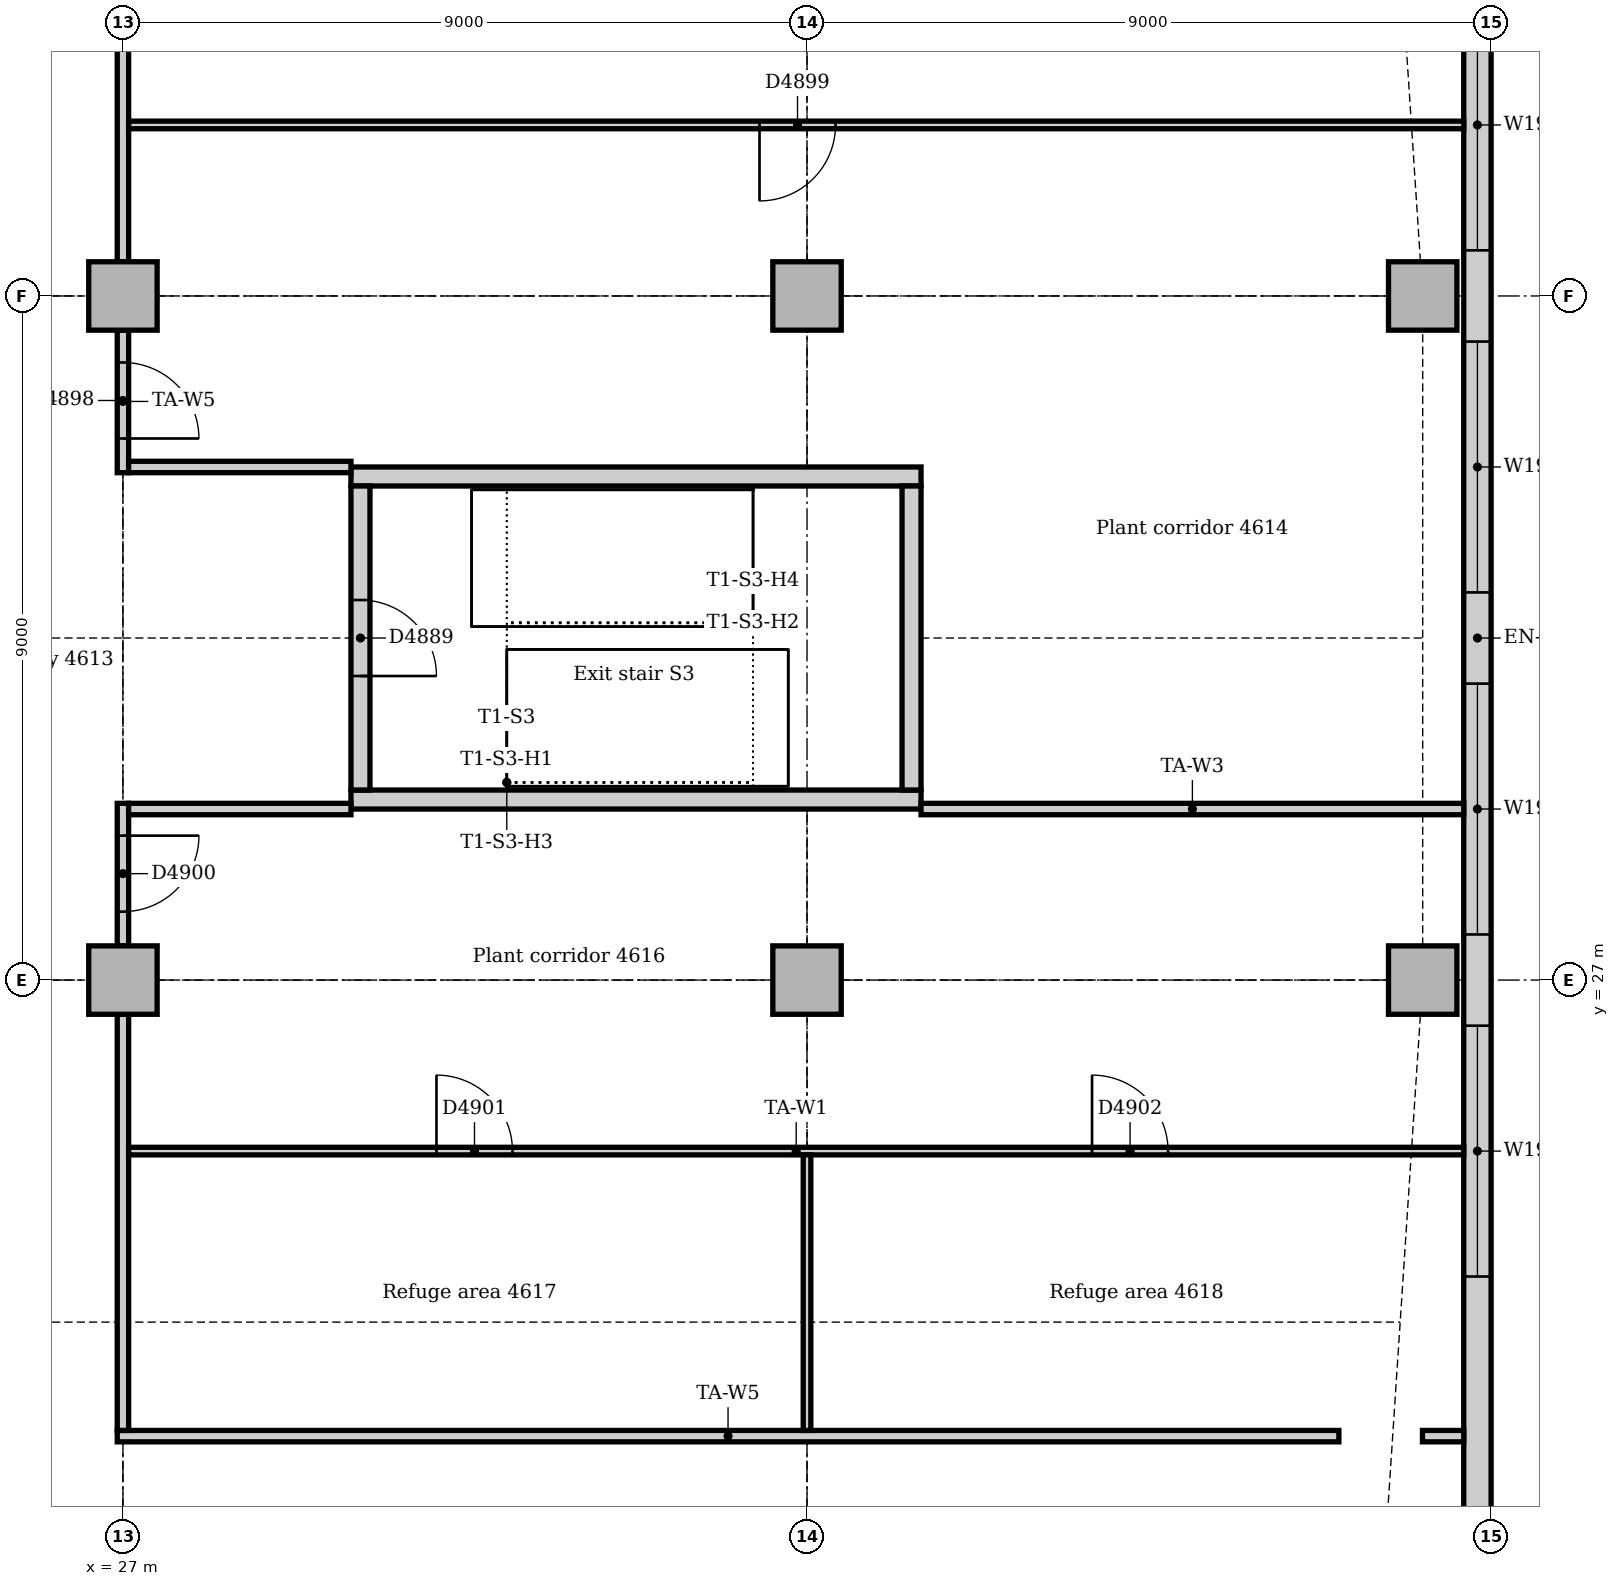
"""IFC4 building model, lengths in metres.
Left out: names, types, materials, properties, quantities, classifications, styles, units other than length and angle.
Written with IfcOpenShell. Run it as: python <this file> out.ifc"""

import sys

from ifc_helpers import new_model, si_unit, direction, frame, frame_2d, origin, origin_2d, place, context, subcontext, project, spatial, rectangle, extrude, element, fill, save


model = new_model("IFC4")
c1 = context("Model", 3, precision=1e-05, world=origin(), true_north=direction((0.0, 1.0)))
c2 = subcontext(c1, "Body", "Model", "MODEL_VIEW")
j1 = project(units=[si_unit("LENGTHUNIT", "METRE"), si_unit("PLANEANGLEUNIT", "RADIAN")], contexts=[c1])
p1 = place(None, origin())
s1 = spatial("IfcSite", under=j1, at=p1, CompositionType="ELEMENT")
p2 = place(p1, origin())
s2 = spatial("IfcBuilding", under=s1, at=p2, CompositionType="ELEMENT")
p3 = place(p2, frame((0.0, 0.0, 193.0)))
s3 = spatial("IfcBuildingStorey", under=s2, at=p3, CompositionType="ELEMENT", Elevation=193.0)
for number, where, z_axis, x_axis in (
    (1, (30.0, 29.375, 0.0), (0.0, 0.0, 1.0), (1.0, 0.0, 0.0)),
    (2, (37.5, 33.625, 0.0), (0.0, 0.0, 1.0), (-1.0, 0.0, 0.0)),
):
    element("IfcWall", number, at=place(p3, frame(where, z_axis=z_axis, x_axis=x_axis)), inside=s3, PredefinedType="SOLIDWALL", context=c2, shape_type="SweptSolid", body=[
        extrude(rectangle(XDim=7.5, YDim=0.25, at=frame_2d((3.75, 0.0))), origin(), (0.0, 0.0, 1.0), 5.0),
    ])
p4 = place(p3, frame((37.375, 29.5, 0.0), z_axis=(0.0, 0.0, 1.0), x_axis=(0.0, 1.0, 0.0)))
e3 = element("IfcWall", 3, at=p4, inside=s3, PredefinedType="SOLIDWALL", context=c2, shape_type="SweptSolid", body=[
    extrude(rectangle(XDim=4.0, YDim=0.25, at=frame_2d((2.0, 0.0))), origin(), (0.0, 0.0, 1.0), 5.0),
])
p5 = place(p3, frame((30.125, 33.5, 0.0), z_axis=(0.0, 0.0, 1.0), x_axis=(0.0, -1.0, 0.0)))
e4 = element("IfcWall", 4, at=p5, inside=s3, PredefinedType="SOLIDWALL", context=c2, shape_type="SweptSolid", body=[
    extrude(rectangle(XDim=4.0, YDim=0.25, at=frame_2d((2.0, 0.0))), origin(), (0.0, 0.0, 1.0), 5.0),
])
p6 = place(p5, frame((1.5, 0.0, 0.0)))
e5 = element("IfcOpeningElement", 5, at=p6, cuts=e4, PredefinedType="OPENING", context=c2, shape_type="SweptSolid", body=[
    extrude(rectangle(XDim=1.0, YDim=2.1, at=frame_2d((0.5, 1.05))), frame((0.0, 0.135, 0.0), z_axis=(0.0, -1.0, 0.0), x_axis=(1.0, 0.0, 0.0)), (0.0, 0.0, 1.0), 0.27),
])
for number, where, z_axis, x_axis in (
    (6, (44.1, 27.0, 0.0), (0.0, 0.0, 1.0), (1.0, 0.0, 0.0)),
    (7, (44.1, 36.0, 0.0), (0.0, 0.0, 1.0), (1.0, 0.0, 0.0)),
    (8, (27.0, 27.0, 0.0), (0.0, 0.0, 1.0), (1.0, 0.0, 0.0)),
    (9, (27.0, 36.0, 0.0), (0.0, 0.0, 1.0), (1.0, 0.0, 0.0)),
    (10, (36.0, 27.0, 0.0), (0.0, 0.0, 1.0), (1.0, 0.0, 0.0)),
    (11, (36.0, 36.0, 0.0), (0.0, 0.0, 1.0), (1.0, 0.0, 0.0)),
):
    element("IfcColumn", number, at=place(p3, frame(where, z_axis=z_axis, x_axis=x_axis)), inside=s3, PredefinedType="COLUMN", context=c2, shape_type="SweptSolid", body=[
        extrude(rectangle(XDim=0.9, YDim=0.9, at=origin_2d()), origin(), (0.0, 0.0, 1.0), 4.85),
    ])
p7 = place(p3, frame((44.82, 19.243, 0.0), z_axis=(0.0, 0.0, 1.0), x_axis=(0.0, 1.0, 0.0)))
e12 = element("IfcWall", 12, at=p7, inside=s3, PredefinedType="STANDARD", context=c2, shape_type="SweptSolid", body=[
    extrude(rectangle(XDim=24.515, YDim=0.36, at=frame_2d((12.257, 0.0))), origin(), (0.0, 0.0, 1.0), 4.85),
])
p8 = place(p7, frame((3.857, 0.0, 0.9)))
e13 = element("IfcOpeningElement", 13, at=p8, cuts=e12, PredefinedType="OPENING", context=c2, shape_type="SweptSolid", body=[
    extrude(rectangle(XDim=3.3, YDim=2.2, at=frame_2d((1.65, 1.1))), frame((0.0, 0.19, 0.0), z_axis=(0.0, -1.0, 0.0), x_axis=(1.0, 0.0, 0.0)), (0.0, 0.0, 1.0), 0.38),
])
p9 = place(p7, frame((8.357, 0.0, 0.9)))
e14 = element("IfcOpeningElement", 14, at=p9, cuts=e12, PredefinedType="OPENING", context=c2, shape_type="SweptSolid", body=[
    extrude(rectangle(XDim=3.3, YDim=2.2, at=frame_2d((1.65, 1.1))), frame((0.0, 0.19, 0.0), z_axis=(0.0, -1.0, 0.0), x_axis=(1.0, 0.0, 0.0)), (0.0, 0.0, 1.0), 0.38),
])
p10 = place(p7, frame((12.857, 0.0, 0.9)))
e15 = element("IfcOpeningElement", 15, at=p10, cuts=e12, PredefinedType="OPENING", context=c2, shape_type="SweptSolid", body=[
    extrude(rectangle(XDim=3.3, YDim=2.2, at=frame_2d((1.65, 1.1))), frame((0.0, 0.19, 0.0), z_axis=(0.0, -1.0, 0.0), x_axis=(1.0, 0.0, 0.0)), (0.0, 0.0, 1.0), 0.38),
])
p11 = place(p7, frame((17.357, 0.0, 0.9)))
e16 = element("IfcOpeningElement", 16, at=p11, cuts=e12, PredefinedType="OPENING", context=c2, shape_type="SweptSolid", body=[
    extrude(rectangle(XDim=3.3, YDim=2.2, at=frame_2d((1.65, 1.1))), frame((0.0, 0.19, 0.0), z_axis=(0.0, -1.0, 0.0), x_axis=(1.0, 0.0, 0.0)), (0.0, 0.0, 1.0), 0.38),
])
p12 = place(p3, frame((26.925, 21.0, 0.0), z_axis=(0.0, 0.0, 1.0), x_axis=(1.0, 0.0, 0.0)))
e17 = element("IfcWall", 17, at=p12, inside=s3, PredefinedType="PARTITIONING", context=c2, shape_type="SweptSolid", body=[
    extrude(rectangle(XDim=16.072, YDim=0.15, at=frame_2d((8.036, 0.0))), origin(), (0.0, 0.0, 1.0), 4.85),
])
p13 = place(p3, frame((44.097, 21.0, 0.0), z_axis=(0.0, 0.0, 1.0), x_axis=(1.0, 0.0, 0.0)))
e18 = element("IfcWall", 18, at=p13, inside=s3, PredefinedType="PARTITIONING", context=c2, shape_type="SweptSolid", body=[
    extrude(rectangle(XDim=0.543, YDim=0.15, at=frame_2d((0.272, 0.0))), origin(), (0.0, 0.0, 1.0), 4.85),
])
p14 = place(p3, frame((27.0, 33.675, 0.0), z_axis=(0.0, 0.0, 1.0), x_axis=(0.0, 1.0, 0.0)))
e19 = element("IfcWall", 19, at=p14, inside=s3, PredefinedType="PARTITIONING", context=c2, shape_type="SweptSolid", body=[
    extrude(rectangle(XDim=1.875, YDim=0.15, at=frame_2d((0.938, 0.0))), origin(), (0.0, 0.0, 1.0), 4.35),
])
p15 = place(p14, frame((0.45, 0.0, 0.0)))
e20 = element("IfcOpeningElement", 20, at=p15, cuts=e19, PredefinedType="OPENING", context=c2, shape_type="SweptSolid", body=[
    extrude(rectangle(XDim=1.0, YDim=2.1, at=frame_2d((0.5, 1.05))), frame((0.0, 0.085, 0.0), z_axis=(0.0, -1.0, 0.0), x_axis=(1.0, 0.0, 0.0)), (0.0, 0.0, 1.0), 0.17),
])
p16 = place(p3, frame((27.0, 36.45, 0.0), z_axis=(0.0, 0.0, 1.0), x_axis=(0.0, 1.0, 0.0)))
e21 = element("IfcWall", 21, at=p16, inside=s3, PredefinedType="PARTITIONING", context=c2, shape_type="SweptSolid", body=[
    extrude(rectangle(XDim=7.2, YDim=0.15, at=frame_2d((3.6, 0.0))), origin(), (0.0, 0.0, 1.0), 4.35),
])
p17 = place(p3, frame((27.0, 21.075, 0.0), z_axis=(0.0, 0.0, 1.0), x_axis=(0.0, 1.0, 0.0)))
e22 = element("IfcWall", 22, at=p17, inside=s3, PredefinedType="PARTITIONING", context=c2, shape_type="SweptSolid", body=[
    extrude(rectangle(XDim=5.475, YDim=0.15, at=frame_2d((2.737, 0.0))), origin(), (0.0, 0.0, 1.0), 4.35),
])
p18 = place(p3, frame((27.0, 27.45, 0.0), z_axis=(0.0, 0.0, 1.0), x_axis=(0.0, 1.0, 0.0)))
e23 = element("IfcWall", 23, at=p18, inside=s3, PredefinedType="PARTITIONING", context=c2, shape_type="SweptSolid", body=[
    extrude(rectangle(XDim=1.875, YDim=0.15, at=frame_2d((0.938, 0.0))), origin(), (0.0, 0.0, 1.0), 4.35),
])
p19 = place(p18, frame((0.45, 0.0, 0.0)))
e24 = element("IfcOpeningElement", 24, at=p19, cuts=e23, PredefinedType="OPENING", context=c2, shape_type="SweptSolid", body=[
    extrude(rectangle(XDim=1.0, YDim=2.1, at=frame_2d((0.5, 1.05))), frame((0.0, 0.085, 0.0), z_axis=(0.0, -1.0, 0.0), x_axis=(1.0, 0.0, 0.0)), (0.0, 0.0, 1.0), 0.17),
])
for number, where, z_axis, x_axis in (
    (25, (27.075, 29.25, 0.0), (0.0, 0.0, 1.0), (1.0, 0.0, 0.0)),
    (26, (27.075, 33.75, 0.0), (0.0, 0.0, 1.0), (1.0, 0.0, 0.0)),
):
    element("IfcWall", number, at=place(p3, frame(where, z_axis=z_axis, x_axis=x_axis)), inside=s3, PredefinedType="PARTITIONING", context=c2, shape_type="SweptSolid", body=[
        extrude(rectangle(XDim=2.925, YDim=0.15, at=frame_2d((1.462, 0.0))), origin(), (0.0, 0.0, 1.0), 4.85),
    ])
p20 = place(p3, frame((37.5, 29.25, 0.0), z_axis=(0.0, 0.0, 1.0), x_axis=(1.0, 0.0, 0.0)))
e27 = element("IfcWall", 27, at=p20, inside=s3, PredefinedType="PARTITIONING", context=c2, shape_type="SweptSolid", body=[
    extrude(rectangle(XDim=7.14, YDim=0.15, at=frame_2d((3.57, 0.0))), origin(), (0.0, 0.0, 1.0), 4.85),
])
p21 = place(p3, frame((27.075, 24.75, 0.0), z_axis=(0.0, 0.0, 1.0), x_axis=(1.0, 0.0, 0.0)))
e28 = element("IfcWall", 28, at=p21, inside=s3, PredefinedType="PARTITIONING", context=c2, shape_type="SweptSolid", body=[
    extrude(rectangle(XDim=17.565, YDim=0.1, at=frame_2d((8.783, 0.0))), origin(), (0.0, 0.0, 1.0), 4.85),
])
p22 = place(p21, frame((4.05, 0.0, 0.0)))
e29 = element("IfcOpeningElement", 29, at=p22, cuts=e28, PredefinedType="OPENING", context=c2, shape_type="SweptSolid", body=[
    extrude(rectangle(XDim=1.0, YDim=2.1, at=frame_2d((0.5, 1.05))), frame((0.0, 0.06, 0.0), z_axis=(0.0, -1.0, 0.0), x_axis=(1.0, 0.0, 0.0)), (0.0, 0.0, 1.0), 0.12),
])
p23 = place(p21, frame((12.675, 0.0, 0.0)))
e30 = element("IfcOpeningElement", 30, at=p23, cuts=e28, PredefinedType="OPENING", context=c2, shape_type="SweptSolid", body=[
    extrude(rectangle(XDim=1.0, YDim=2.1, at=frame_2d((0.5, 1.05))), frame((0.0, 0.06, 0.0), z_axis=(0.0, -1.0, 0.0), x_axis=(1.0, 0.0, 0.0)), (0.0, 0.0, 1.0), 0.12),
])
p24 = place(p3, frame((27.075, 38.25, 0.0), z_axis=(0.0, 0.0, 1.0), x_axis=(1.0, 0.0, 0.0)))
e31 = element("IfcWall", 31, at=p24, inside=s3, PredefinedType="PARTITIONING", context=c2, shape_type="SweptSolid", body=[
    extrude(rectangle(XDim=17.565, YDim=0.1, at=frame_2d((8.783, 0.0))), origin(), (0.0, 0.0, 1.0), 4.85),
])
p25 = place(p24, frame((8.3, 0.0, 0.0)))
e32 = element("IfcOpeningElement", 32, at=p25, cuts=e31, PredefinedType="OPENING", context=c2, shape_type="SweptSolid", body=[
    extrude(rectangle(XDim=1.0, YDim=2.1, at=frame_2d((0.5, 1.05))), frame((0.0, 0.06, 0.0), z_axis=(0.0, -1.0, 0.0), x_axis=(1.0, 0.0, 0.0)), (0.0, 0.0, 1.0), 0.12),
])
p26 = place(p3, frame((36.0, 21.075, 0.0), z_axis=(0.0, 0.0, 1.0), x_axis=(0.0, 1.0, 0.0)))
e33 = element("IfcWall", 33, at=p26, inside=s3, PredefinedType="PARTITIONING", context=c2, shape_type="SweptSolid", body=[
    extrude(rectangle(XDim=3.625, YDim=0.1, at=frame_2d((1.812, 0.0))), origin(), (0.0, 0.0, 1.0), 4.35),
])
p27 = place(p8, origin())
e34 = element("IfcWindow", 34, at=p27, inside=s3, PartitioningType="SINGLE_PANEL", PredefinedType="WINDOW", context=c2, shape_type="SweptSolid", body=[
    extrude(rectangle(XDim=3.3, YDim=2.2, at=frame_2d((1.65, 1.1))), frame((0.0, 0.13, 0.0), z_axis=(0.0, -1.0, 0.0), x_axis=(1.0, 0.0, 0.0)), (0.0, 0.0, 1.0), 0.06),
])
fill(e13, e34)
p28 = place(p9, origin())
e35 = element("IfcWindow", 35, at=p28, inside=s3, PartitioningType="SINGLE_PANEL", PredefinedType="WINDOW", context=c2, shape_type="SweptSolid", body=[
    extrude(rectangle(XDim=3.3, YDim=2.2, at=frame_2d((1.65, 1.1))), frame((0.0, 0.13, 0.0), z_axis=(0.0, -1.0, 0.0), x_axis=(1.0, 0.0, 0.0)), (0.0, 0.0, 1.0), 0.06),
])
fill(e14, e35)
p29 = place(p10, origin())
e36 = element("IfcWindow", 36, at=p29, inside=s3, PartitioningType="SINGLE_PANEL", PredefinedType="WINDOW", context=c2, shape_type="SweptSolid", body=[
    extrude(rectangle(XDim=3.3, YDim=2.2, at=frame_2d((1.65, 1.1))), frame((0.0, 0.13, 0.0), z_axis=(0.0, -1.0, 0.0), x_axis=(1.0, 0.0, 0.0)), (0.0, 0.0, 1.0), 0.06),
])
fill(e15, e36)
p30 = place(p11, origin())
e37 = element("IfcWindow", 37, at=p30, inside=s3, PartitioningType="SINGLE_PANEL", PredefinedType="WINDOW", context=c2, shape_type="SweptSolid", body=[
    extrude(rectangle(XDim=3.3, YDim=2.2, at=frame_2d((1.65, 1.1))), frame((0.0, 0.13, 0.0), z_axis=(0.0, -1.0, 0.0), x_axis=(1.0, 0.0, 0.0)), (0.0, 0.0, 1.0), 0.06),
])
fill(e16, e37)
p31 = place(p6, origin())
e38 = element("IfcDoor", 38, at=p31, inside=s3, OperationType="SINGLE_SWING_RIGHT", PredefinedType="DOOR", context=c2, shape_type="SweptSolid", body=[
    extrude(rectangle(XDim=1.0, YDim=2.1, at=frame_2d((0.5, 1.05))), frame((0.0, 0.025, 0.0), z_axis=(0.0, -1.0, 0.0), x_axis=(1.0, 0.0, 0.0)), (0.0, 0.0, 1.0), 0.05),
])
fill(e5, e38)
p32 = place(p15, frame((1.0, 0.0, 0.0), z_axis=(0.0, 0.0, 1.0), x_axis=(-1.0, 0.0, 0.0)))
e39 = element("IfcDoor", 39, at=p32, inside=s3, OperationType="SINGLE_SWING_RIGHT", PredefinedType="DOOR", context=c2, shape_type="SweptSolid", body=[
    extrude(rectangle(XDim=1.0, YDim=2.1, at=frame_2d((0.5, 1.05))), frame((0.0, 0.025, 0.0), z_axis=(0.0, -1.0, 0.0), x_axis=(1.0, 0.0, 0.0)), (0.0, 0.0, 1.0), 0.05),
])
fill(e20, e39)
p33 = place(p25, frame((1.0, 0.0, 0.0), z_axis=(0.0, 0.0, 1.0), x_axis=(-1.0, 0.0, 0.0)))
e40 = element("IfcDoor", 40, at=p33, inside=s3, OperationType="SINGLE_SWING_RIGHT", PredefinedType="DOOR", context=c2, shape_type="SweptSolid", body=[
    extrude(rectangle(XDim=1.0, YDim=2.1, at=frame_2d((0.5, 1.05))), frame((0.0, 0.025, 0.0), z_axis=(0.0, -1.0, 0.0), x_axis=(1.0, 0.0, 0.0)), (0.0, 0.0, 1.0), 0.05),
])
fill(e32, e40)
p34 = place(p19, frame((1.0, 0.0, 0.0), z_axis=(0.0, 0.0, 1.0), x_axis=(-1.0, 0.0, 0.0)))
e41 = element("IfcDoor", 41, at=p34, inside=s3, OperationType="SINGLE_SWING_LEFT", PredefinedType="DOOR", context=c2, shape_type="SweptSolid", body=[
    extrude(rectangle(XDim=1.0, YDim=2.1, at=frame_2d((0.5, 1.05))), frame((0.0, 0.025, 0.0), z_axis=(0.0, -1.0, 0.0), x_axis=(1.0, 0.0, 0.0)), (0.0, 0.0, 1.0), 0.05),
])
fill(e24, e41)
p35 = place(p22, origin())
e42 = element("IfcDoor", 42, at=p35, inside=s3, OperationType="SINGLE_SWING_LEFT", PredefinedType="DOOR", context=c2, shape_type="SweptSolid", body=[
    extrude(rectangle(XDim=1.0, YDim=2.1, at=frame_2d((0.5, 1.05))), frame((0.0, 0.025, 0.0), z_axis=(0.0, -1.0, 0.0), x_axis=(1.0, 0.0, 0.0)), (0.0, 0.0, 1.0), 0.05),
])
fill(e29, e42)
p36 = place(p23, origin())
e43 = element("IfcDoor", 43, at=p36, inside=s3, OperationType="SINGLE_SWING_LEFT", PredefinedType="DOOR", context=c2, shape_type="SweptSolid", body=[
    extrude(rectangle(XDim=1.0, YDim=2.1, at=frame_2d((0.5, 1.05))), frame((0.0, 0.025, 0.0), z_axis=(0.0, -1.0, 0.0), x_axis=(1.0, 0.0, 0.0)), (0.0, 0.0, 1.0), 0.05),
])
fill(e30, e43)
save(model, sys.argv[1])
